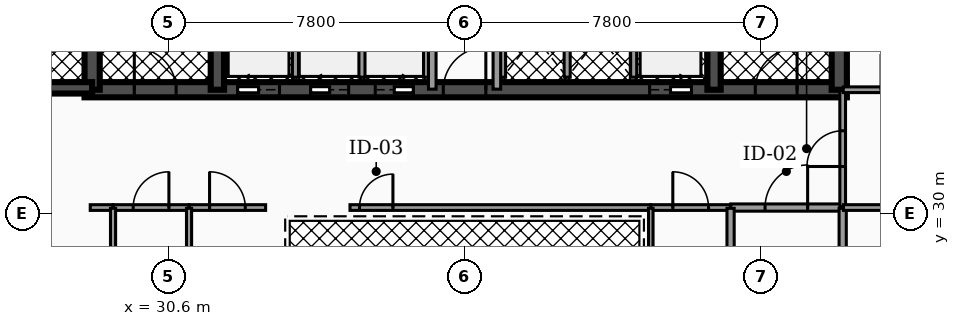
"""IFC4 building model, lengths in metres.
Left out: names, types, materials, properties, quantities, classifications, styles, units other than length and angle.
Written with IfcOpenShell. Run it as: python <this file> out.ifc"""

import sys

from ifc_helpers import new_model, si_unit, direction, frame, frame_2d, origin, place, context, subcontext, project, spatial, rectangle, extrude, element, fill, save


model = new_model("IFC4")
c1 = context("Model", 3, precision=1e-05, world=origin(), true_north=direction((0.0, 1.0)))
c2 = subcontext(c1, "Body", "Model", "MODEL_VIEW")
j1 = project(units=[si_unit("LENGTHUNIT", "METRE"), si_unit("PLANEANGLEUNIT", "RADIAN")], contexts=[c1])
p1 = place(None, origin())
s1 = spatial("IfcSite", under=j1, at=p1, CompositionType="ELEMENT")
p2 = place(p1, origin())
s2 = spatial("IfcBuilding", under=s1, at=p2, CompositionType="ELEMENT")
p3 = place(p2, frame((0.0, 0.0, 134.64)))
s3 = spatial("IfcBuildingStorey", under=s2, at=p3, CompositionType="ELEMENT", Elevation=134.64)
p4 = place(p3, frame((28.4, 33.25, 0.0), z_axis=(0.0, 0.0, 1.0), x_axis=(1.0, 0.0, 0.0)))
e1 = element("IfcWall", 1, at=p4, inside=s3, PredefinedType="SHEAR", context=c2, shape_type="SweptSolid", body=[
    extrude(rectangle(XDim=20.06, YDim=0.4, at=frame_2d((10.03, 0.0))), origin(), (0.0, 0.0, 1.0), 3.5),
])
p5 = place(p4, frame((4.03, 0.0, 0.0)))
e2 = element("IfcOpeningElement", 2, at=p5, cuts=e1, PredefinedType="OPENING", context=c2, shape_type="SweptSolid", body=[
    extrude(rectangle(XDim=1.1, YDim=2.15, at=frame_2d((0.55, 1.075))), frame((0.0, 0.21, 0.0), z_axis=(0.0, -1.0, 0.0), x_axis=(1.0, 0.0, 0.0)), (0.0, 0.0, 1.0), 0.42),
])
p6 = place(p4, frame((14.87, 0.0, 0.0)))
e3 = element("IfcOpeningElement", 3, at=p6, cuts=e1, PredefinedType="OPENING", context=c2, shape_type="SweptSolid", body=[
    extrude(rectangle(XDim=1.1, YDim=2.15, at=frame_2d((0.55, 1.075))), frame((0.0, 0.21, 0.0), z_axis=(0.0, -1.0, 0.0), x_axis=(1.0, 0.0, 0.0)), (0.0, 0.0, 1.0), 0.42),
])
p7 = place(p4, frame((5.95, 0.0, 0.0)))
e4 = element("IfcOpeningElement", 4, at=p7, cuts=e1, PredefinedType="OPENING", context=c2, shape_type="SweptSolid", body=[
    extrude(rectangle(XDim=1.0, YDim=2.1, at=frame_2d((0.5, 1.05))), frame((0.0, 0.21, 0.0), z_axis=(0.0, -1.0, 0.0), x_axis=(1.0, 0.0, 0.0)), (0.0, 0.0, 1.0), 0.42),
])
p8 = place(p4, frame((7.65, 0.0, 0.0)))
e5 = element("IfcOpeningElement", 5, at=p8, cuts=e1, PredefinedType="OPENING", context=c2, shape_type="SweptSolid", body=[
    extrude(rectangle(XDim=1.0, YDim=2.1, at=frame_2d((0.5, 1.05))), frame((0.0, 0.21, 0.0), z_axis=(0.0, -1.0, 0.0), x_axis=(1.0, 0.0, 0.0)), (0.0, 0.0, 1.0), 0.42),
])
p9 = place(p4, frame((1.31, 0.0, 0.0)))
e6 = element("IfcOpeningElement", 6, at=p9, cuts=e1, PredefinedType="OPENING", context=c2, shape_type="SweptSolid", body=[
    extrude(rectangle(XDim=1.1, YDim=2.2, at=frame_2d((0.55, 1.1))), frame((0.0, 0.21, 0.0), z_axis=(0.0, -1.0, 0.0), x_axis=(1.0, 0.0, 0.0)), (0.0, 0.0, 1.0), 0.42),
])
p10 = place(p4, frame((9.44, 0.0, 0.0)))
e7 = element("IfcOpeningElement", 7, at=p10, cuts=e1, PredefinedType="OPENING", context=c2, shape_type="SweptSolid", body=[
    extrude(rectangle(XDim=1.12, YDim=2.05, at=frame_2d((0.56, 1.025))), frame((0.0, 0.21, 0.0), z_axis=(0.0, -1.0, 0.0), x_axis=(1.0, 0.0, 0.0)), (0.0, 0.0, 1.0), 0.42),
])
p11 = place(p4, frame((17.65, 0.0, 0.0)))
e8 = element("IfcOpeningElement", 8, at=p11, cuts=e1, PredefinedType="OPENING", context=c2, shape_type="SweptSolid", body=[
    extrude(rectangle(XDim=1.1, YDim=2.2, at=frame_2d((0.55, 1.1))), frame((0.0, 0.21, 0.0), z_axis=(0.0, -1.0, 0.0), x_axis=(1.0, 0.0, 0.0)), (0.0, 0.0, 1.0), 0.42),
])
p12 = place(p3, frame((28.6, 33.25, 0.0), z_axis=(0.0, 0.0, 1.0), x_axis=(0.0, 1.0, 0.0)))
e9 = element("IfcWall", 9, at=p12, inside=s3, PredefinedType="SHEAR", context=c2, shape_type="SweptSolid", body=[
    extrude(rectangle(XDim=10.2, YDim=0.4, at=frame_2d((5.1, 0.0))), origin(), (0.0, 0.0, 1.0), 3.5),
])
for number, where, z_axis, x_axis in (
    (10, (31.895, 33.25, 0.0), (0.0, 0.0, 1.0), (0.0, 1.0, 0.0)),
    (11, (44.965, 33.25, 0.0), (0.0, 0.0, 1.0), (0.0, 1.0, 0.0)),
):
    element("IfcWall", number, at=place(p3, frame(where, z_axis=z_axis, x_axis=x_axis)), inside=s3, PredefinedType="SHEAR", context=c2, shape_type="SweptSolid", body=[
        extrude(rectangle(XDim=10.2, YDim=0.35, at=frame_2d((5.1, 0.0))), origin(), (0.0, 0.0, 1.0), 3.5),
    ])
p13 = place(p3, frame((48.26, 33.25, 0.0), z_axis=(0.0, 0.0, 1.0), x_axis=(0.0, 1.0, 0.0)))
e12 = element("IfcWall", 12, at=p13, inside=s3, PredefinedType="SHEAR", context=c2, shape_type="SweptSolid", body=[
    extrude(rectangle(XDim=10.2, YDim=0.4, at=frame_2d((5.1, 0.0))), origin(), (0.0, 0.0, 1.0), 3.5),
])
p14 = place(p3, frame((25.08, 33.3, 0.0), z_axis=(0.0, 0.0, 1.0), x_axis=(1.0, 0.0, 0.0)))
e13 = element("IfcWall", 13, at=p14, inside=s3, PredefinedType="SHEAR", context=c2, shape_type="SweptSolid", body=[
    extrude(rectangle(XDim=3.52, YDim=0.3, at=frame_2d((1.76, 0.0))), origin(), (0.0, 0.0, 1.0), 3.5),
])
p15 = place(p14, frame((1.335, 0.0, 0.0)))
e14 = element("IfcOpeningElement", 14, at=p15, cuts=e13, PredefinedType="OPENING", context=c2, shape_type="SweptSolid", body=[
    extrude(rectangle(XDim=0.95, YDim=2.2, at=frame_2d((0.475, 1.1))), frame((0.0, 0.16, 0.0), z_axis=(0.0, -1.0, 0.0), x_axis=(1.0, 0.0, 0.0)), (0.0, 0.0, 1.0), 0.32),
])
for number, where, z_axis, x_axis in (
    (15, (33.95, 33.58, 0.0), (0.0, 0.0, 1.0), (0.0, 1.0, 0.0)),
    (16, (42.85, 33.58, 0.0), (0.0, 0.0, 1.0), (0.0, 1.0, 0.0)),
):
    element("IfcWall", number, at=place(p3, frame(where, z_axis=z_axis, x_axis=x_axis)), inside=s3, PredefinedType="SOLIDWALL", context=c2, shape_type="SweptSolid", body=[
        extrude(rectangle(XDim=2.45, YDim=0.16, at=frame_2d((1.225, 0.0))), origin(), (0.0, 0.0, 1.0), 2.472),
    ])
for number, where, z_axis, x_axis in (
    (17, (35.7, 33.58, 0.0), (0.0, 0.0, 1.0), (0.0, 1.0, 0.0)),
    (18, (37.4, 33.58, 0.0), (0.0, 0.0, 1.0), (0.0, 1.0, 0.0)),
    (19, (39.4, 33.58, 0.0), (0.0, 0.0, 1.0), (0.0, 1.0, 0.0)),
    (20, (41.1, 33.58, 0.0), (0.0, 0.0, 1.0), (0.0, 1.0, 0.0)),
):
    element("IfcWall", number, at=place(p3, frame(where, z_axis=z_axis, x_axis=x_axis)), inside=s3, PredefinedType="SOLIDWALL", context=c2, shape_type="SweptSolid", body=[
        extrude(rectangle(XDim=2.25, YDim=0.16, at=frame_2d((1.125, 0.0))), origin(), (0.0, 0.0, 1.0), 2.472),
    ])
p16 = place(p3, frame((37.55, 33.265, 0.0), z_axis=(0.0, 0.0, 1.0), x_axis=(0.0, 1.0, 0.0)))
e21 = element("IfcWall", 21, at=p16, inside=s3, PredefinedType="PARTITIONING", context=c2, shape_type="SweptSolid", body=[
    extrude(rectangle(XDim=4.595, YDim=0.2, at=frame_2d((2.298, 0.0))), origin(), (0.0, 0.0, 1.0), 2.457),
])
p17 = place(p16, frame((3.058, 0.0, 0.0)))
e22 = element("IfcOpeningElement", 22, at=p17, cuts=e21, PredefinedType="OPENING", context=c2, shape_type="SweptSolid", body=[
    extrude(rectangle(XDim=0.88, YDim=2.05, at=frame_2d((0.44, 1.025))), frame((0.0, 0.11, 0.0), z_axis=(0.0, -1.0, 0.0), x_axis=(1.0, 0.0, 0.0)), (0.0, 0.0, 1.0), 0.22),
])
p18 = place(p3, frame((39.25, 33.265, 0.0), z_axis=(0.0, 0.0, 1.0), x_axis=(0.0, 1.0, 0.0)))
e23 = element("IfcWall", 23, at=p18, inside=s3, PredefinedType="PARTITIONING", context=c2, shape_type="SweptSolid", body=[
    extrude(rectangle(XDim=4.595, YDim=0.2, at=frame_2d((2.298, 0.0))), origin(), (0.0, 0.0, 1.0), 2.457),
])
p19 = place(p18, frame((3.058, 0.0, 0.0)))
e24 = element("IfcOpeningElement", 24, at=p19, cuts=e23, PredefinedType="OPENING", context=c2, shape_type="SweptSolid", body=[
    extrude(rectangle(XDim=0.88, YDim=2.05, at=frame_2d((0.44, 1.025))), frame((0.0, 0.11, 0.0), z_axis=(0.0, -1.0, 0.0), x_axis=(1.0, 0.0, 0.0)), (0.0, 0.0, 1.0), 0.22),
])
p20 = place(p3, frame((45.405, 30.15, 0.0), z_axis=(0.0, 0.0, 1.0), x_axis=(1.0, 0.0, 0.0)))
e25 = element("IfcWall", 25, at=p20, inside=s3, PredefinedType="PARTITIONING", context=c2, shape_type="SweptSolid", body=[
    extrude(rectangle(XDim=2.925, YDim=0.19, at=frame_2d((1.462, 0.0))), origin(), (0.0, 0.0, 1.0), 2.457),
])
p21 = place(p20, frame((0.903, 0.0, 0.0)))
e26 = element("IfcOpeningElement", 26, at=p21, cuts=e25, PredefinedType="OPENING", context=c2, shape_type="SweptSolid", body=[
    extrude(rectangle(XDim=1.12, YDim=2.05, at=frame_2d((0.56, 1.025))), frame((0.0, 0.105, 0.0), z_axis=(0.0, -1.0, 0.0), x_axis=(1.0, 0.0, 0.0)), (0.0, 0.0, 1.0), 0.21),
])
p22 = place(p3, frame((48.35, 30.17, 0.0), z_axis=(0.0, 0.0, 1.0), x_axis=(0.0, 1.0, 0.0)))
e27 = element("IfcWall", 27, at=p22, inside=s3, PredefinedType="PARTITIONING", context=c2, shape_type="SweptSolid", body=[
    extrude(rectangle(XDim=3.06, YDim=0.15, at=frame_2d((1.53, 0.0))), origin(), (0.0, 0.0, 1.0), 2.457),
])
p23 = place(p22, frame((1.06, 0.0, 0.0)))
e28 = element("IfcOpeningElement", 28, at=p23, cuts=e27, PredefinedType="OPENING", context=c2, shape_type="SweptSolid", body=[
    extrude(rectangle(XDim=0.94, YDim=2.05, at=frame_2d((0.47, 1.025))), frame((0.0, 0.085, 0.0), z_axis=(0.0, -1.0, 0.0), x_axis=(1.0, 0.0, 0.0)), (0.0, 0.0, 1.0), 0.17),
])
p24 = place(p3, frame((28.55, 30.15, 0.0), z_axis=(0.0, 0.0, 1.0), x_axis=(1.0, 0.0, 0.0)))
e29 = element("IfcWall", 29, at=p24, inside=s3, PredefinedType="PARTITIONING", context=c2, shape_type="SweptSolid", body=[
    extrude(rectangle(XDim=0.595, YDim=0.15, at=frame_2d((0.297, 0.0))), origin(), (0.0, 0.0, 1.0), 2.457),
])
p25 = place(p3, frame((29.155, 30.15, 0.0), z_axis=(0.0, 0.0, 1.0), x_axis=(1.0, 0.0, 0.0)))
e30 = element("IfcWall", 30, at=p25, inside=s3, PredefinedType="PARTITIONING", context=c2, shape_type="SweptSolid", body=[
    extrude(rectangle(XDim=1.99, YDim=0.15, at=frame_2d((0.995, 0.0))), origin(), (0.0, 0.0, 1.0), 2.457),
])
p26 = place(p25, frame((0.525, 0.0, 0.0)))
e31 = element("IfcOpeningElement", 31, at=p26, cuts=e30, PredefinedType="OPENING", context=c2, shape_type="SweptSolid", body=[
    extrude(rectangle(XDim=0.94, YDim=2.05, at=frame_2d((0.47, 1.025))), frame((0.0, 0.085, 0.0), z_axis=(0.0, -1.0, 0.0), x_axis=(1.0, 0.0, 0.0)), (0.0, 0.0, 1.0), 0.17),
])
p27 = place(p3, frame((31.155, 30.15, 0.0), z_axis=(0.0, 0.0, 1.0), x_axis=(1.0, 0.0, 0.0)))
e32 = element("IfcWall", 32, at=p27, inside=s3, PredefinedType="PARTITIONING", context=c2, shape_type="SweptSolid", body=[
    extrude(rectangle(XDim=2.01, YDim=0.15, at=frame_2d((1.005, 0.0))), origin(), (0.0, 0.0, 1.0), 2.457),
])
p28 = place(p27, frame((0.535, 0.0, 0.0)))
e33 = element("IfcOpeningElement", 33, at=p28, cuts=e32, PredefinedType="OPENING", context=c2, shape_type="SweptSolid", body=[
    extrude(rectangle(XDim=0.94, YDim=2.05, at=frame_2d((0.47, 1.025))), frame((0.0, 0.085, 0.0), z_axis=(0.0, -1.0, 0.0), x_axis=(1.0, 0.0, 0.0)), (0.0, 0.0, 1.0), 0.17),
])
p29 = place(p3, frame((35.385, 30.15, 0.0), z_axis=(0.0, 0.0, 1.0), x_axis=(1.0, 0.0, 0.0)))
e34 = element("IfcWall", 34, at=p29, inside=s3, PredefinedType="PARTITIONING", context=c2, shape_type="SweptSolid", body=[
    extrude(rectangle(XDim=7.91, YDim=0.15, at=frame_2d((3.955, 0.0))), origin(), (0.0, 0.0, 1.0), 2.457),
])
p30 = place(p29, frame((0.25, 0.0, 0.0)))
e35 = element("IfcOpeningElement", 35, at=p30, cuts=e34, PredefinedType="OPENING", context=c2, shape_type="SweptSolid", body=[
    extrude(rectangle(XDim=0.88, YDim=2.05, at=frame_2d((0.44, 1.025))), frame((0.0, 0.085, 0.0), z_axis=(0.0, -1.0, 0.0), x_axis=(1.0, 0.0, 0.0)), (0.0, 0.0, 1.0), 0.17),
])
p31 = place(p3, frame((43.305, 30.15, 0.0), z_axis=(0.0, 0.0, 1.0), x_axis=(1.0, 0.0, 0.0)))
e36 = element("IfcWall", 36, at=p31, inside=s3, PredefinedType="PARTITIONING", context=c2, shape_type="SweptSolid", body=[
    extrude(rectangle(XDim=2.09, YDim=0.15, at=frame_2d((1.045, 0.0))), origin(), (0.0, 0.0, 1.0), 2.457),
])
p32 = place(p31, frame((0.575, 0.0, 0.0)))
e37 = element("IfcOpeningElement", 37, at=p32, cuts=e36, PredefinedType="OPENING", context=c2, shape_type="SweptSolid", body=[
    extrude(rectangle(XDim=0.94, YDim=2.05, at=frame_2d((0.47, 1.025))), frame((0.0, 0.085, 0.0), z_axis=(0.0, -1.0, 0.0), x_axis=(1.0, 0.0, 0.0)), (0.0, 0.0, 1.0), 0.17),
])
for number, where, z_axis, x_axis in (
    (38, (45.4, 27.37, 0.0), (0.0, 0.0, 1.0), (0.0, 1.0, 0.0)),
    (39, (48.35, 27.37, 0.0), (0.0, 0.0, 1.0), (0.0, 1.0, 0.0)),
):
    element("IfcWall", number, at=place(p3, frame(where, z_axis=z_axis, x_axis=x_axis)), inside=s3, PredefinedType="PARTITIONING", context=c2, shape_type="SweptSolid", body=[
        extrude(rectangle(XDim=2.76, YDim=0.19, at=frame_2d((1.38, 0.0))), origin(), (0.0, 0.0, 1.0), 2.457),
    ])
p33 = place(p3, frame((48.37, 30.15, 0.0), z_axis=(0.0, 0.0, 1.0), x_axis=(1.0, 0.0, 0.0)))
e40 = element("IfcWall", 40, at=p33, inside=s3, PredefinedType="PARTITIONING", context=c2, shape_type="SweptSolid", body=[
    extrude(rectangle(XDim=1.309, YDim=0.15, at=frame_2d((0.654, 0.0))), origin(), (0.0, 0.0, 1.0), 2.457),
])
p34 = place(p3, frame((48.365, 33.25, 0.0), z_axis=(0.0, 0.0, 1.0), x_axis=(1.0, 0.0, 0.0)))
e41 = element("IfcWall", 41, at=p34, inside=s3, PredefinedType="PARTITIONING", context=c2, shape_type="SweptSolid", body=[
    extrude(rectangle(XDim=2.93, YDim=0.15, at=frame_2d((1.465, 0.0))), origin(), (0.0, 0.0, 1.0), 2.457),
])
p35 = place(p34, frame((0.995, 0.0, 0.0)))
e42 = element("IfcOpeningElement", 42, at=p35, cuts=e41, PredefinedType="OPENING", context=c2, shape_type="SweptSolid", body=[
    extrude(rectangle(XDim=0.94, YDim=2.05, at=frame_2d((0.47, 1.025))), frame((0.0, 0.085, 0.0), z_axis=(0.0, -1.0, 0.0), x_axis=(1.0, 0.0, 0.0)), (0.0, 0.0, 1.0), 0.17),
])
p36 = place(p3, frame((29.15, 27.17, 0.0), z_axis=(0.0, 0.0, 1.0), x_axis=(0.0, 1.0, 0.0)))
e43 = element("IfcWall", 43, at=p36, inside=s3, PredefinedType="PARTITIONING", context=c2, shape_type="SweptSolid", body=[
    extrude(rectangle(XDim=2.96, YDim=0.135, at=frame_2d((1.48, 0.0))), origin(), (0.0, 0.0, 1.0), 2.457),
])
p37 = place(p36, frame((1.05, 0.0, 0.0)))
e44 = element("IfcOpeningElement", 44, at=p37, cuts=e43, PredefinedType="OPENING", context=c2, shape_type="SweptSolid", body=[
    extrude(rectangle(XDim=0.86, YDim=2.05, at=frame_2d((0.43, 1.025))), frame((0.0, 0.077, 0.0), z_axis=(0.0, -1.0, 0.0), x_axis=(1.0, 0.0, 0.0)), (0.0, 0.0, 1.0), 0.155),
])
p38 = place(p3, frame((31.15, 27.17, 0.0), z_axis=(0.0, 0.0, 1.0), x_axis=(0.0, 1.0, 0.0)))
e45 = element("IfcWall", 45, at=p38, inside=s3, PredefinedType="PARTITIONING", context=c2, shape_type="SweptSolid", body=[
    extrude(rectangle(XDim=2.96, YDim=0.135, at=frame_2d((1.48, 0.0))), origin(), (0.0, 0.0, 1.0), 2.457),
])
p39 = place(p3, frame((43.3, 24.078, 0.0), z_axis=(0.0, 0.0, 1.0), x_axis=(0.0, 1.0, 0.0)))
e46 = element("IfcWall", 46, at=p39, inside=s3, PredefinedType="PARTITIONING", context=c2, shape_type="SweptSolid", body=[
    extrude(rectangle(XDim=6.052, YDim=0.12, at=frame_2d((3.026, 0.0))), origin(), (0.0, 0.0, 1.0), 2.457),
])
p40 = place(p5, origin())
e47 = element("IfcDoor", 47, at=p40, inside=s3, OperationType="SLIDING_TO_LEFT", PredefinedType="DOOR", context=c2, shape_type="SweptSolid", body=[
    extrude(rectangle(XDim=1.1, YDim=2.15, at=frame_2d((0.55, 1.075))), frame((0.0, 0.025, 0.0), z_axis=(0.0, -1.0, 0.0), x_axis=(1.0, 0.0, 0.0)), (0.0, 0.0, 1.0), 0.05),
])
fill(e2, e47)
p41 = place(p6, origin())
e48 = element("IfcDoor", 48, at=p41, inside=s3, OperationType="SLIDING_TO_RIGHT", PredefinedType="DOOR", context=c2, shape_type="SweptSolid", body=[
    extrude(rectangle(XDim=1.1, YDim=2.15, at=frame_2d((0.55, 1.075))), frame((0.0, 0.025, 0.0), z_axis=(0.0, -1.0, 0.0), x_axis=(1.0, 0.0, 0.0)), (0.0, 0.0, 1.0), 0.05),
])
fill(e3, e48)
p42 = place(p7, origin())
e49 = element("IfcDoor", 49, at=p42, inside=s3, OperationType="SLIDING_TO_LEFT", PredefinedType="DOOR", context=c2, shape_type="SweptSolid", body=[
    extrude(rectangle(XDim=1.0, YDim=2.1, at=frame_2d((0.5, 1.05))), frame((0.0, 0.025, 0.0), z_axis=(0.0, -1.0, 0.0), x_axis=(1.0, 0.0, 0.0)), (0.0, 0.0, 1.0), 0.05),
])
fill(e4, e49)
p43 = place(p8, origin())
e50 = element("IfcDoor", 50, at=p43, inside=s3, OperationType="SLIDING_TO_RIGHT", PredefinedType="DOOR", context=c2, shape_type="SweptSolid", body=[
    extrude(rectangle(XDim=1.0, YDim=2.1, at=frame_2d((0.5, 1.05))), frame((0.0, 0.025, 0.0), z_axis=(0.0, -1.0, 0.0), x_axis=(1.0, 0.0, 0.0)), (0.0, 0.0, 1.0), 0.05),
])
fill(e5, e50)
p44 = place(p9, origin())
e51 = element("IfcDoor", 51, at=p44, inside=s3, OperationType="SINGLE_SWING_LEFT", PredefinedType="DOOR", context=c2, shape_type="SweptSolid", body=[
    extrude(rectangle(XDim=1.1, YDim=2.2, at=frame_2d((0.55, 1.1))), frame((0.0, 0.025, 0.0), z_axis=(0.0, -1.0, 0.0), x_axis=(1.0, 0.0, 0.0)), (0.0, 0.0, 1.0), 0.05),
])
fill(e6, e51)
p45 = place(p10, origin())
e52 = element("IfcDoor", 52, at=p45, inside=s3, OperationType="SINGLE_SWING_RIGHT", PredefinedType="DOOR", context=c2, shape_type="SweptSolid", body=[
    extrude(rectangle(XDim=1.12, YDim=2.05, at=frame_2d((0.56, 1.025))), frame((0.0, 0.025, 0.0), z_axis=(0.0, -1.0, 0.0), x_axis=(1.0, 0.0, 0.0)), (0.0, 0.0, 1.0), 0.05),
])
fill(e7, e52)
p46 = place(p11, origin())
e53 = element("IfcDoor", 53, at=p46, inside=s3, OperationType="SINGLE_SWING_RIGHT", PredefinedType="DOOR", context=c2, shape_type="SweptSolid", body=[
    extrude(rectangle(XDim=1.1, YDim=2.2, at=frame_2d((0.55, 1.1))), frame((0.0, 0.025, 0.0), z_axis=(0.0, -1.0, 0.0), x_axis=(1.0, 0.0, 0.0)), (0.0, 0.0, 1.0), 0.05),
])
fill(e8, e53)
p47 = place(p21, origin())
e54 = element("IfcDoor", 54, at=p47, inside=s3, OperationType="SINGLE_SWING_RIGHT", PredefinedType="DOOR", context=c2, shape_type="SweptSolid", body=[
    extrude(rectangle(XDim=1.12, YDim=2.05, at=frame_2d((0.56, 1.025))), frame((0.0, 0.025, 0.0), z_axis=(0.0, -1.0, 0.0), x_axis=(1.0, 0.0, 0.0)), (0.0, 0.0, 1.0), 0.05),
])
fill(e26, e54)
p48 = place(p23, origin())
e55 = element("IfcDoor", 55, at=p48, inside=s3, OperationType="SINGLE_SWING_LEFT", PredefinedType="DOOR", context=c2, shape_type="SweptSolid", body=[
    extrude(rectangle(XDim=0.94, YDim=2.05, at=frame_2d((0.47, 1.025))), frame((0.0, 0.025, 0.0), z_axis=(0.0, -1.0, 0.0), x_axis=(1.0, 0.0, 0.0)), (0.0, 0.0, 1.0), 0.05),
])
fill(e28, e55)
p49 = place(p26, origin())
e56 = element("IfcDoor", 56, at=p49, inside=s3, OperationType="SINGLE_SWING_RIGHT", PredefinedType="DOOR", context=c2, shape_type="SweptSolid", body=[
    extrude(rectangle(XDim=0.94, YDim=2.05, at=frame_2d((0.47, 1.025))), frame((0.0, 0.025, 0.0), z_axis=(0.0, -1.0, 0.0), x_axis=(1.0, 0.0, 0.0)), (0.0, 0.0, 1.0), 0.05),
])
fill(e31, e56)
p50 = place(p28, origin())
e57 = element("IfcDoor", 57, at=p50, inside=s3, OperationType="SINGLE_SWING_LEFT", PredefinedType="DOOR", context=c2, shape_type="SweptSolid", body=[
    extrude(rectangle(XDim=0.94, YDim=2.05, at=frame_2d((0.47, 1.025))), frame((0.0, 0.025, 0.0), z_axis=(0.0, -1.0, 0.0), x_axis=(1.0, 0.0, 0.0)), (0.0, 0.0, 1.0), 0.05),
])
fill(e33, e57)
p51 = place(p30, origin())
e58 = element("IfcDoor", 58, at=p51, inside=s3, OperationType="SINGLE_SWING_RIGHT", PredefinedType="DOOR", context=c2, shape_type="SweptSolid", body=[
    extrude(rectangle(XDim=0.88, YDim=2.05, at=frame_2d((0.44, 1.025))), frame((0.0, 0.025, 0.0), z_axis=(0.0, -1.0, 0.0), x_axis=(1.0, 0.0, 0.0)), (0.0, 0.0, 1.0), 0.05),
])
fill(e35, e58)
p52 = place(p32, origin())
e59 = element("IfcDoor", 59, at=p52, inside=s3, OperationType="SINGLE_SWING_LEFT", PredefinedType="DOOR", context=c2, shape_type="SweptSolid", body=[
    extrude(rectangle(XDim=0.94, YDim=2.05, at=frame_2d((0.47, 1.025))), frame((0.0, 0.025, 0.0), z_axis=(0.0, -1.0, 0.0), x_axis=(1.0, 0.0, 0.0)), (0.0, 0.0, 1.0), 0.05),
])
fill(e37, e59)
save(model, sys.argv[1])
